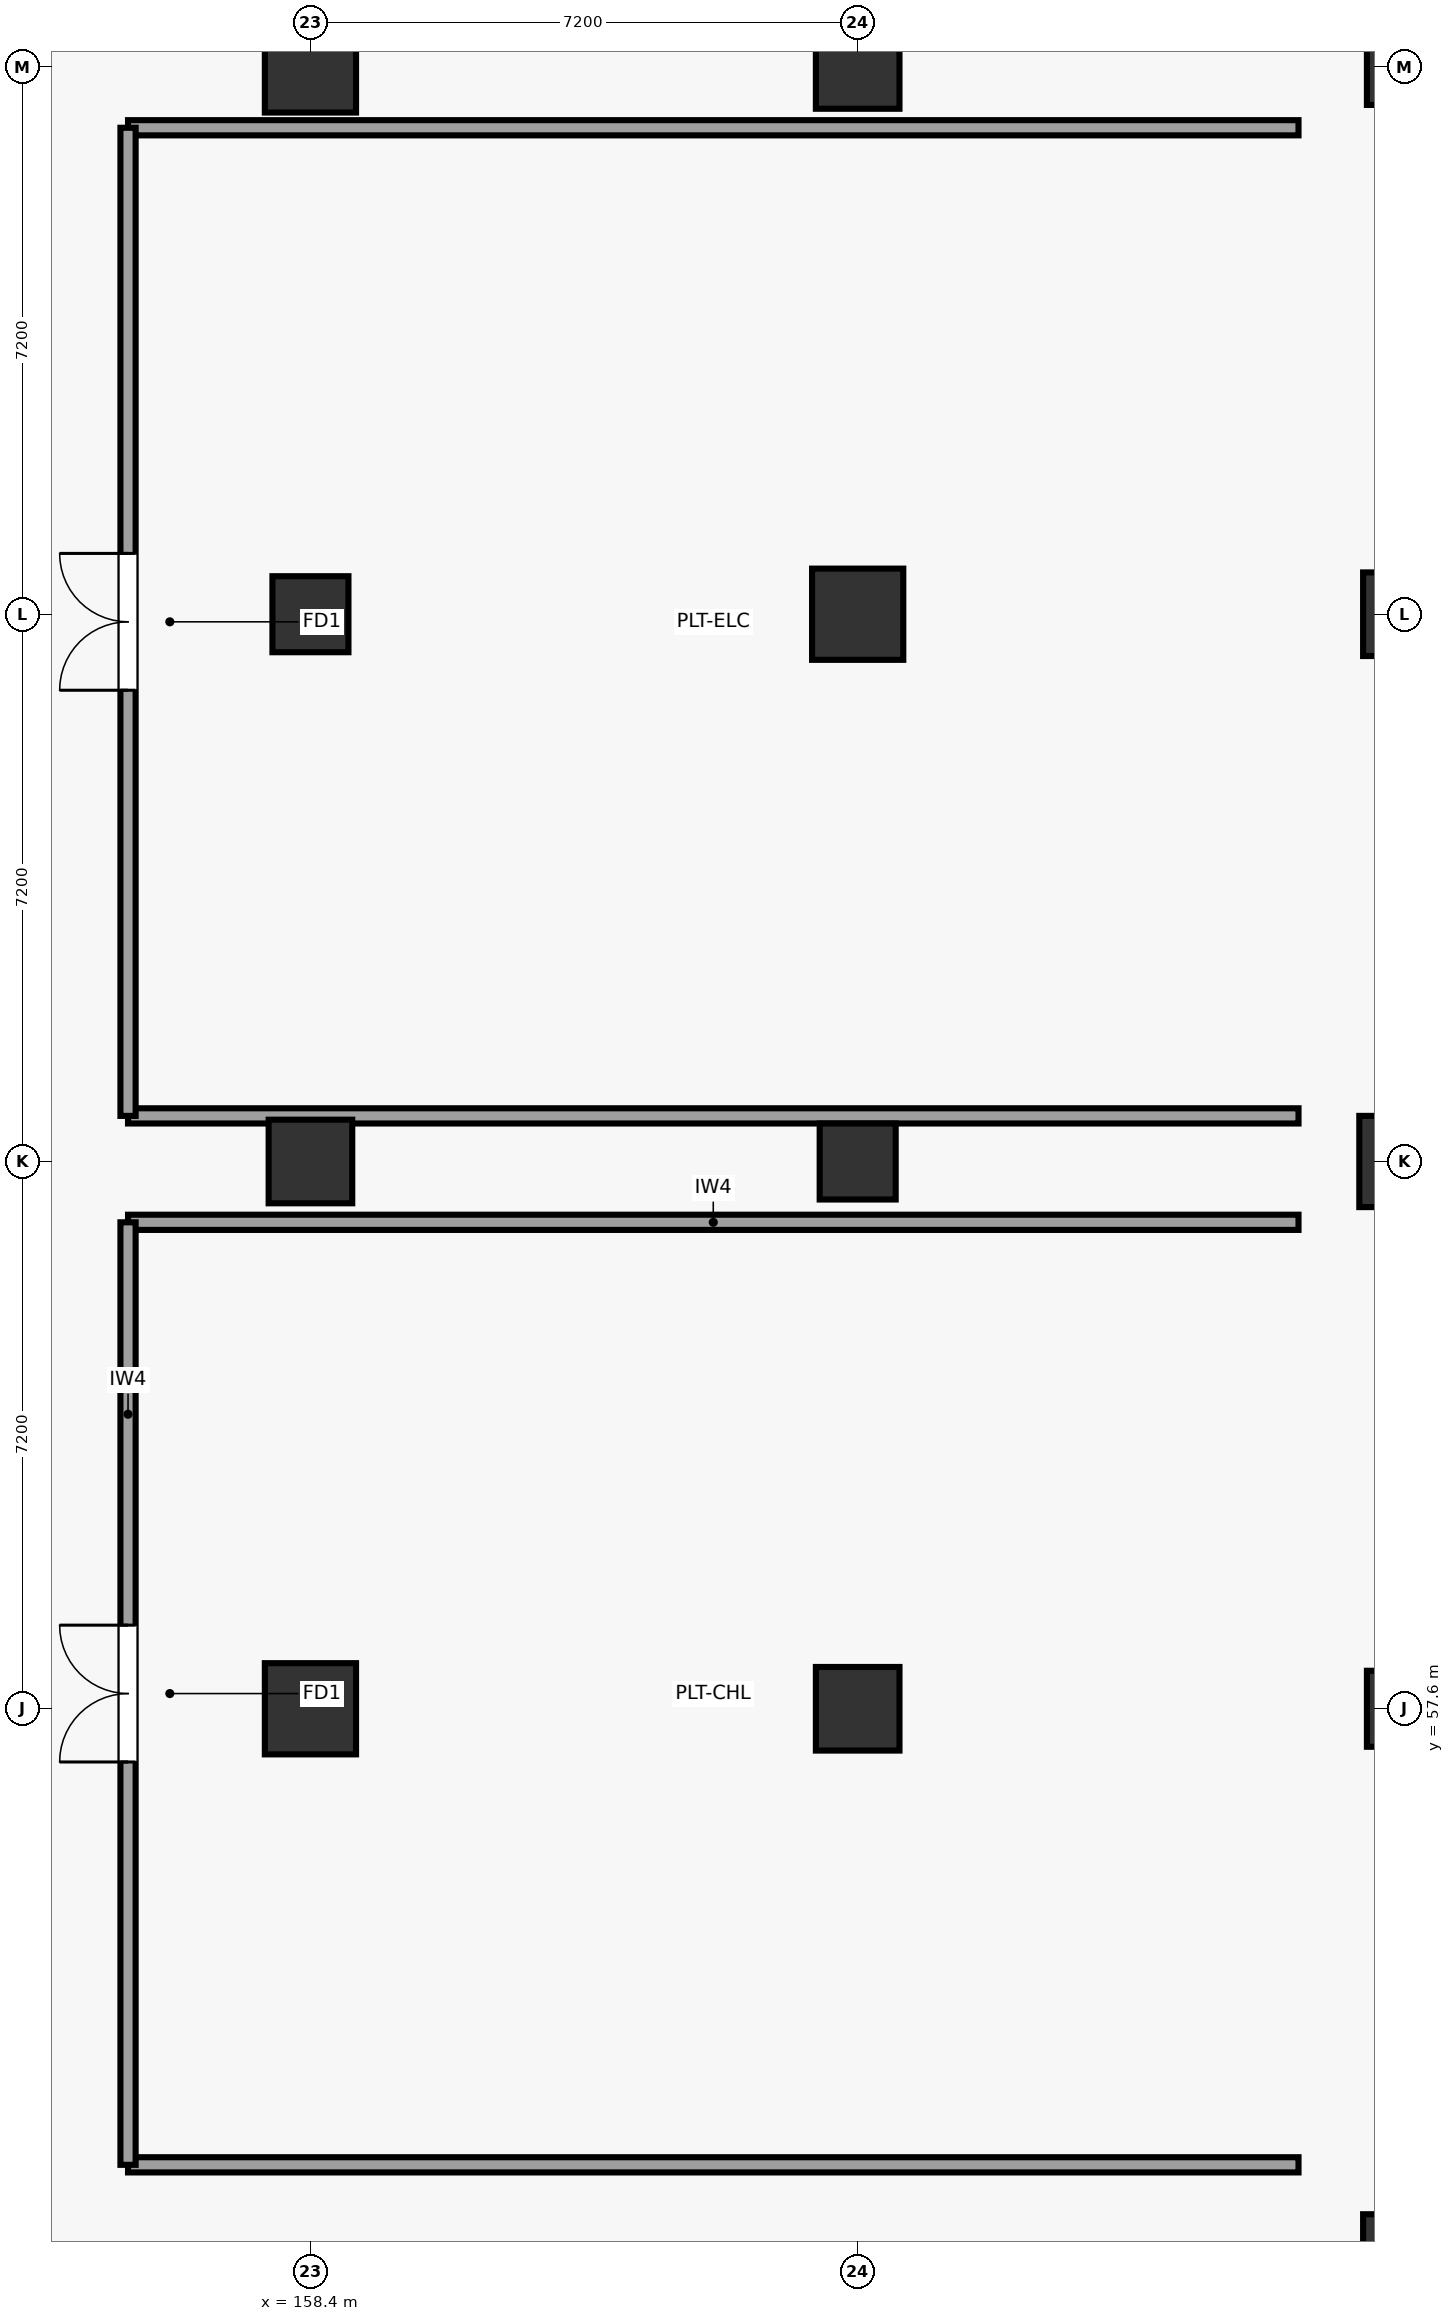
"""IFC4 building model, lengths in metres.
Left out: names, types, materials, properties, quantities, classifications, styles, units other than length and angle.
Written with IfcOpenShell. Run it as: python <this file> out.ifc"""

import sys

from ifc_helpers import new_model, si_unit, direction, frame, frame_2d, origin, origin_2d, place, context, subcontext, project, spatial, rectangle, circle, extrude, element, fill, save


model = new_model("IFC4")
c1 = context("Model", 3, precision=1e-05, world=origin(), true_north=direction((0.0, 1.0)))
c2 = subcontext(c1, "Body", "Model", "MODEL_VIEW")
j1 = project(units=[si_unit("LENGTHUNIT", "METRE"), si_unit("PLANEANGLEUNIT", "RADIAN")], contexts=[c1])
p1 = place(None, origin())
s1 = spatial("IfcSite", under=j1, at=p1, CompositionType="ELEMENT")
p2 = place(p1, origin())
s2 = spatial("IfcBuilding", under=s1, at=p2, CompositionType="ELEMENT")
p3 = place(p2, frame((0.0, 0.0, -5.4)))
s3 = spatial("IfcBuildingStorey", under=s2, at=p3, CompositionType="ELEMENT", Elevation=-5.4)
p4 = place(p3, frame((158.4, 57.6, 0.0), z_axis=(0.0, 0.0, 1.0), x_axis=(1.0, 0.0, 0.0)))
e1 = element("IfcColumn", 1, at=p4, inside=s3, PredefinedType="COLUMN", context=c2, shape_type="SweptSolid", body=[
    extrude(circle(Radius=0.6, at=origin_2d()), origin(), (0.0, 0.0, 1.0), 5.4),
])
p5 = place(p3, frame((158.4, 64.8, 0.0), z_axis=(0.0, 0.0, 1.0), x_axis=(1.0, 0.0, 0.0)))
e2 = element("IfcColumn", 2, at=p5, inside=s3, PredefinedType="COLUMN", context=c2, shape_type="SweptSolid", body=[
    extrude(rectangle(XDim=1.1, YDim=1.1, at=origin_2d()), origin(), (0.0, 0.0, 1.0), 5.4),
])
p6 = place(p3, frame((158.4, 72.0, 0.0), z_axis=(0.0, 0.0, 1.0), x_axis=(1.0, 0.0, 0.0)))
e3 = element("IfcColumn", 3, at=p6, inside=s3, PredefinedType="COLUMN", context=c2, shape_type="SweptSolid", body=[
    extrude(rectangle(XDim=1.0, YDim=1.0, at=origin_2d()), origin(), (0.0, 0.0, 1.0), 5.4),
])
p7 = place(p3, frame((158.4, 79.2, 0.0), z_axis=(0.0, 0.0, 1.0), x_axis=(1.0, 0.0, 0.0)))
e4 = element("IfcColumn", 4, at=p7, inside=s3, PredefinedType="COLUMN", context=c2, shape_type="SweptSolid", body=[
    extrude(circle(Radius=0.6, at=origin_2d()), origin(), (0.0, 0.0, 1.0), 5.4),
])
p8 = place(p3, frame((165.6, 57.6, 0.0), z_axis=(0.0, 0.0, 1.0), x_axis=(1.0, 0.0, 0.0)))
e5 = element("IfcColumn", 5, at=p8, inside=s3, PredefinedType="COLUMN", context=c2, shape_type="SweptSolid", body=[
    extrude(rectangle(XDim=1.1, YDim=1.1, at=origin_2d()), origin(), (0.0, 0.0, 1.0), 5.4),
])
p9 = place(p3, frame((165.6, 64.8, 0.0), z_axis=(0.0, 0.0, 1.0), x_axis=(1.0, 0.0, 0.0)))
e6 = element("IfcColumn", 6, at=p9, inside=s3, PredefinedType="COLUMN", context=c2, shape_type="SweptSolid", body=[
    extrude(rectangle(XDim=1.0, YDim=1.0, at=origin_2d()), origin(), (0.0, 0.0, 1.0), 5.4),
])
p10 = place(p3, frame((165.6, 72.0, 0.0), z_axis=(0.0, 0.0, 1.0), x_axis=(1.0, 0.0, 0.0)))
e7 = element("IfcColumn", 7, at=p10, inside=s3, PredefinedType="COLUMN", context=c2, shape_type="SweptSolid", body=[
    extrude(circle(Radius=0.6, at=origin_2d()), origin(), (0.0, 0.0, 1.0), 5.4),
])
for number, where, z_axis, x_axis in (
    (8, (165.6, 79.2, 0.0), (0.0, 0.0, 1.0), (1.0, 0.0, 0.0)),
    (9, (172.8, 50.4, 0.0), (0.0, 0.0, 1.0), (1.0, 0.0, 0.0)),
):
    element("IfcColumn", number, at=place(p3, frame(where, z_axis=z_axis, x_axis=x_axis)), inside=s3, PredefinedType="COLUMN", context=c2, shape_type="SweptSolid", body=[
        extrude(rectangle(XDim=1.1, YDim=1.1, at=origin_2d()), origin(), (0.0, 0.0, 1.0), 5.4),
    ])
p11 = place(p3, frame((172.8, 57.6, 0.0), z_axis=(0.0, 0.0, 1.0), x_axis=(1.0, 0.0, 0.0)))
e10 = element("IfcColumn", 10, at=p11, inside=s3, PredefinedType="COLUMN", context=c2, shape_type="SweptSolid", body=[
    extrude(rectangle(XDim=1.0, YDim=1.0, at=origin_2d()), origin(), (0.0, 0.0, 1.0), 5.4),
])
p12 = place(p3, frame((172.8, 64.8, 0.0), z_axis=(0.0, 0.0, 1.0), x_axis=(1.0, 0.0, 0.0)))
e11 = element("IfcColumn", 11, at=p12, inside=s3, PredefinedType="COLUMN", context=c2, shape_type="SweptSolid", body=[
    extrude(circle(Radius=0.6, at=origin_2d()), origin(), (0.0, 0.0, 1.0), 5.4),
])
p13 = place(p3, frame((172.8, 72.0, 0.0), z_axis=(0.0, 0.0, 1.0), x_axis=(1.0, 0.0, 0.0)))
e12 = element("IfcColumn", 12, at=p13, inside=s3, PredefinedType="COLUMN", context=c2, shape_type="SweptSolid", body=[
    extrude(rectangle(XDim=1.1, YDim=1.1, at=origin_2d()), origin(), (0.0, 0.0, 1.0), 5.4),
])
p14 = place(p3, frame((172.8, 79.2, 0.0), z_axis=(0.0, 0.0, 1.0), x_axis=(1.0, 0.0, 0.0)))
e13 = element("IfcColumn", 13, at=p14, inside=s3, PredefinedType="COLUMN", context=c2, shape_type="SweptSolid", body=[
    extrude(rectangle(XDim=1.0, YDim=1.0, at=origin_2d()), origin(), (0.0, 0.0, 1.0), 5.4),
])
for number, where, z_axis, x_axis in (
    (14, (156.0, 51.6, 0.0), (0.0, 0.0, 1.0), (1.0, 0.0, 0.0)),
    (15, (171.4, 64.0, 0.0), (0.0, 0.0, 1.0), (-1.0, 0.0, 0.0)),
):
    element("IfcWall", number, at=place(p3, frame(where, z_axis=z_axis, x_axis=x_axis)), inside=s3, PredefinedType="PARTITIONING", context=c2, shape_type="SweptSolid", body=[
        extrude(rectangle(XDim=15.4, YDim=0.2, at=frame_2d((7.7, 0.0))), origin(), (0.0, 0.0, 1.0), 4.04),
    ])
p15 = place(p3, frame((156.0, 64.0, 0.0), z_axis=(0.0, 0.0, 1.0), x_axis=(0.0, -1.0, 0.0)))
e16 = element("IfcWall", 16, at=p15, inside=s3, PredefinedType="PARTITIONING", context=c2, shape_type="SweptSolid", body=[
    extrude(rectangle(XDim=12.4, YDim=0.2, at=frame_2d((6.2, 0.0))), origin(), (0.0, 0.0, 1.0), 4.04),
])
p16 = place(p15, frame((5.3, 0.0, 0.0)))
e17 = element("IfcOpeningElement", 17, at=p16, cuts=e16, PredefinedType="OPENING", context=c2, shape_type="SweptSolid", body=[
    extrude(rectangle(XDim=1.8, YDim=2.3, at=frame_2d((0.9, 1.15))), frame((0.0, 0.11, 0.0), z_axis=(0.0, -1.0, 0.0), x_axis=(1.0, 0.0, 0.0)), (0.0, 0.0, 1.0), 0.22),
])
for number, where, z_axis, x_axis in (
    (18, (156.0, 65.4, 0.0), (0.0, 0.0, 1.0), (1.0, 0.0, 0.0)),
    (19, (171.4, 78.4, 0.0), (0.0, 0.0, 1.0), (-1.0, 0.0, 0.0)),
):
    element("IfcWall", number, at=place(p3, frame(where, z_axis=z_axis, x_axis=x_axis)), inside=s3, PredefinedType="PARTITIONING", context=c2, shape_type="SweptSolid", body=[
        extrude(rectangle(XDim=15.4, YDim=0.2, at=frame_2d((7.7, 0.0))), origin(), (0.0, 0.0, 1.0), 4.04),
    ])
p17 = place(p3, frame((156.0, 78.4, 0.0), z_axis=(0.0, 0.0, 1.0), x_axis=(0.0, -1.0, 0.0)))
e20 = element("IfcWall", 20, at=p17, inside=s3, PredefinedType="PARTITIONING", context=c2, shape_type="SweptSolid", body=[
    extrude(rectangle(XDim=13.0, YDim=0.2, at=frame_2d((6.5, 0.0))), origin(), (0.0, 0.0, 1.0), 4.04),
])
p18 = place(p17, frame((5.6, 0.0, 0.0)))
e21 = element("IfcOpeningElement", 21, at=p18, cuts=e20, PredefinedType="OPENING", context=c2, shape_type="SweptSolid", body=[
    extrude(rectangle(XDim=1.8, YDim=2.3, at=frame_2d((0.9, 1.15))), frame((0.0, 0.11, 0.0), z_axis=(0.0, -1.0, 0.0), x_axis=(1.0, 0.0, 0.0)), (0.0, 0.0, 1.0), 0.22),
])
p19 = place(p16, frame((1.8, 0.0, 0.0), z_axis=(0.0, 0.0, 1.0), x_axis=(-1.0, 0.0, 0.0)))
e22 = element("IfcDoor", 22, at=p19, inside=s3, OperationType="DOUBLE_DOOR_SINGLE_SWING", PredefinedType="DOOR", context=c2, shape_type="SweptSolid", body=[
    extrude(rectangle(XDim=1.8, YDim=2.3, at=frame_2d((0.9, 1.15))), frame((0.0, 0.025, 0.0), z_axis=(0.0, -1.0, 0.0), x_axis=(1.0, 0.0, 0.0)), (0.0, 0.0, 1.0), 0.05),
])
fill(e17, e22)
p20 = place(p18, frame((1.8, 0.0, 0.0), z_axis=(0.0, 0.0, 1.0), x_axis=(-1.0, 0.0, 0.0)))
e23 = element("IfcDoor", 23, at=p20, inside=s3, OperationType="DOUBLE_DOOR_SINGLE_SWING", PredefinedType="DOOR", context=c2, shape_type="SweptSolid", body=[
    extrude(rectangle(XDim=1.8, YDim=2.3, at=frame_2d((0.9, 1.15))), frame((0.0, 0.025, 0.0), z_axis=(0.0, -1.0, 0.0), x_axis=(1.0, 0.0, 0.0)), (0.0, 0.0, 1.0), 0.05),
])
fill(e21, e23)
save(model, sys.argv[1])
